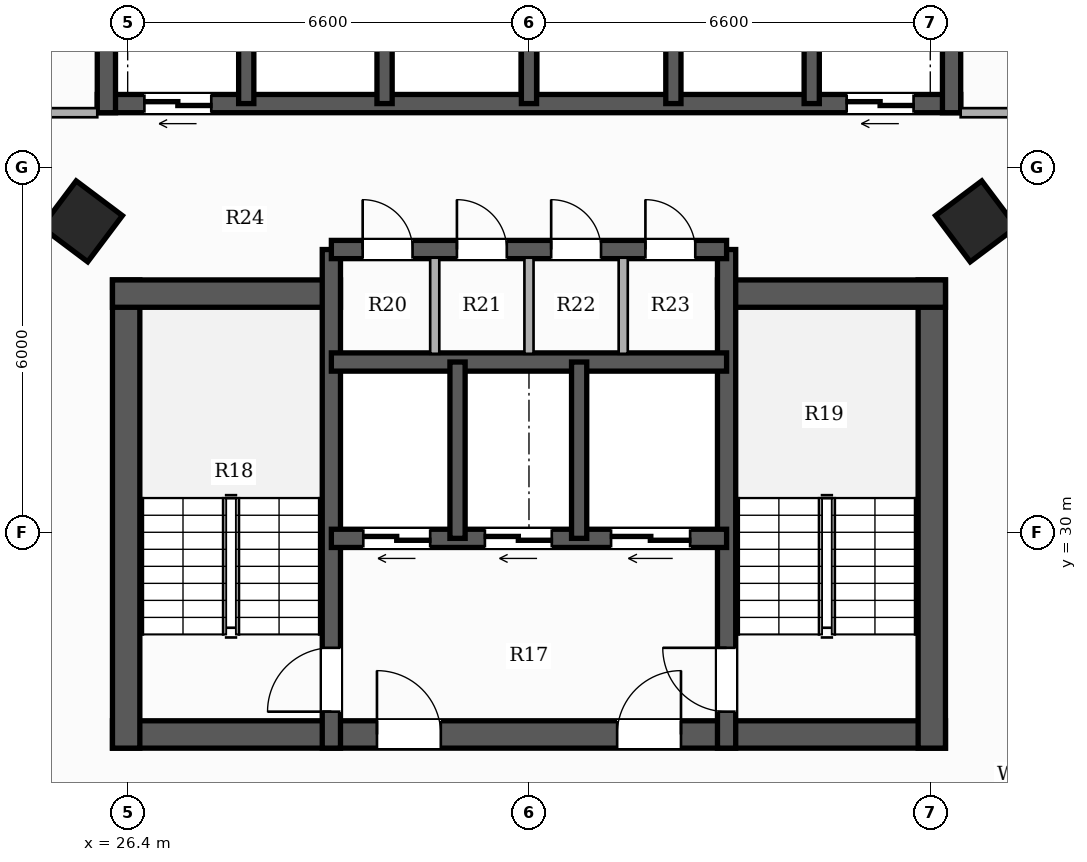
"""IFC4 building model, lengths in metres.
Left out: names, types, materials, properties, quantities, classifications, styles, units other than length and angle.
Written with IfcOpenShell. Run it as: python <this file> out.ifc"""

import sys

from ifc_helpers import new_model, si_unit, direction, frame, frame_2d, origin, origin_2d, place, context, subcontext, project, spatial, rectangle, hollow_rectangle, extrude, element, fill, save


model = new_model("IFC4")
c1 = context("Model", 3, precision=1e-05, world=origin(), true_north=direction((0.0, 1.0)))
c2 = subcontext(c1, "Body", "Model", "MODEL_VIEW")
j1 = project(units=[si_unit("LENGTHUNIT", "METRE"), si_unit("PLANEANGLEUNIT", "RADIAN")], contexts=[c1])
p1 = place(None, origin())
s1 = spatial("IfcSite", under=j1, at=p1, CompositionType="ELEMENT")
p2 = place(p1, origin())
s2 = spatial("IfcBuilding", under=s1, at=p2, CompositionType="ELEMENT")
p3 = place(p2, frame((0.0, 0.0, 70.85)))
s3 = spatial("IfcBuildingStorey", under=s2, at=p3, CompositionType="ELEMENT", Elevation=70.85)
p4 = place(p3, frame((26.15, 26.675, 0.0), z_axis=(0.0, 0.0, 1.0), x_axis=(1.0, 0.0, 0.0)))
e1 = element("IfcWall", 1, at=p4, inside=s3, PredefinedType="SHEAR", context=c2, shape_type="SweptSolid", body=[
    extrude(rectangle(XDim=13.7, YDim=0.45, at=frame_2d((6.85, 0.0))), origin(), (0.0, 0.0, 1.0), 3.3),
])
p5 = place(p4, frame((4.35, 0.0, 0.0)))
e2 = element("IfcOpeningElement", 2, at=p5, cuts=e1, PredefinedType="OPENING", context=c2, shape_type="SweptSolid", body=[
    extrude(rectangle(XDim=1.05, YDim=2.15, at=frame_2d((0.525, 1.075))), frame((0.0, 0.235, 0.0), z_axis=(0.0, -1.0, 0.0), x_axis=(1.0, 0.0, 0.0)), (0.0, 0.0, 1.0), 0.47),
])
p6 = place(p4, frame((8.3, 0.0, 0.0)))
e3 = element("IfcOpeningElement", 3, at=p6, cuts=e1, PredefinedType="OPENING", context=c2, shape_type="SweptSolid", body=[
    extrude(rectangle(XDim=1.05, YDim=2.15, at=frame_2d((0.525, 1.075))), frame((0.0, 0.235, 0.0), z_axis=(0.0, -1.0, 0.0), x_axis=(1.0, 0.0, 0.0)), (0.0, 0.0, 1.0), 0.47),
])
p7 = place(p3, frame((26.375, 26.45, 0.0), z_axis=(0.0, 0.0, 1.0), x_axis=(0.0, 1.0, 0.0)))
e4 = element("IfcWall", 4, at=p7, inside=s3, PredefinedType="SHEAR", context=c2, shape_type="SweptSolid", body=[
    extrude(rectangle(XDim=7.7, YDim=0.45, at=frame_2d((3.85, 0.0))), origin(), (0.0, 0.0, 1.0), 3.3),
])
p8 = place(p3, frame((26.15, 33.925, 0.0), z_axis=(0.0, 0.0, 1.0), x_axis=(1.0, 0.0, 0.0)))
e5 = element("IfcWall", 5, at=p8, inside=s3, PredefinedType="SHEAR", context=c2, shape_type="SweptSolid", body=[
    extrude(rectangle(XDim=3.75, YDim=0.45, at=frame_2d((1.875, 0.0))), origin(), (0.0, 0.0, 1.0), 3.3),
])
p9 = place(p3, frame((39.625, 26.45, 0.0), z_axis=(0.0, 0.0, 1.0), x_axis=(0.0, 1.0, 0.0)))
e6 = element("IfcWall", 6, at=p9, inside=s3, PredefinedType="SHEAR", context=c2, shape_type="SweptSolid", body=[
    extrude(rectangle(XDim=7.7, YDim=0.45, at=frame_2d((3.85, 0.0))), origin(), (0.0, 0.0, 1.0), 3.3),
])
p10 = place(p3, frame((36.1, 33.925, 0.0), z_axis=(0.0, 0.0, 1.0), x_axis=(1.0, 0.0, 0.0)))
e7 = element("IfcWall", 7, at=p10, inside=s3, PredefinedType="SHEAR", context=c2, shape_type="SweptSolid", body=[
    extrude(rectangle(XDim=3.75, YDim=0.45, at=frame_2d((1.875, 0.0))), origin(), (0.0, 0.0, 1.0), 3.3),
])
p11 = place(p3, frame((29.75, 26.45, 0.0), z_axis=(0.0, 0.0, 1.0), x_axis=(0.0, 1.0, 0.0)))
e8 = element("IfcWall", 8, at=p11, inside=s3, PredefinedType="SHEAR", context=c2, shape_type="SweptSolid", body=[
    extrude(rectangle(XDim=8.2, YDim=0.3, at=frame_2d((4.1, 0.0))), origin(), (0.0, 0.0, 1.0), 3.3),
])
p12 = place(p11, frame((0.6, 0.0, 0.0)))
e9 = element("IfcOpeningElement", 9, at=p12, cuts=e8, PredefinedType="OPENING", context=c2, shape_type="SweptSolid", body=[
    extrude(rectangle(XDim=1.05, YDim=2.15, at=frame_2d((0.525, 1.075))), frame((0.0, 0.16, 0.0), z_axis=(0.0, -1.0, 0.0), x_axis=(1.0, 0.0, 0.0)), (0.0, 0.0, 1.0), 0.32),
])
p13 = place(p3, frame((36.25, 26.45, 0.0), z_axis=(0.0, 0.0, 1.0), x_axis=(0.0, 1.0, 0.0)))
e10 = element("IfcWall", 10, at=p13, inside=s3, PredefinedType="SHEAR", context=c2, shape_type="SweptSolid", body=[
    extrude(rectangle(XDim=8.2, YDim=0.3, at=frame_2d((4.1, 0.0))), origin(), (0.0, 0.0, 1.0), 3.3),
])
p14 = place(p13, frame((0.6, 0.0, 0.0)))
e11 = element("IfcOpeningElement", 11, at=p14, cuts=e10, PredefinedType="OPENING", context=c2, shape_type="SweptSolid", body=[
    extrude(rectangle(XDim=1.05, YDim=2.15, at=frame_2d((0.525, 1.075))), frame((0.0, 0.16, 0.0), z_axis=(0.0, -1.0, 0.0), x_axis=(1.0, 0.0, 0.0)), (0.0, 0.0, 1.0), 0.32),
])
p15 = place(p3, frame((36.25, 29.9, 0.0), z_axis=(0.0, 0.0, 1.0), x_axis=(-1.0, 0.0, 0.0)))
e12 = element("IfcWall", 12, at=p15, inside=s3, PredefinedType="SHEAR", context=c2, shape_type="SweptSolid", body=[
    extrude(rectangle(XDim=6.5, YDim=0.3, at=frame_2d((3.25, 0.0))), origin(), (0.0, 0.0, 1.0), 3.3),
])
p16 = place(p15, frame((4.875, 0.0, 0.0)))
e13 = element("IfcOpeningElement", 13, at=p16, cuts=e12, PredefinedType="OPENING", context=c2, shape_type="SweptSolid", body=[
    extrude(rectangle(XDim=1.1, YDim=2.2, at=frame_2d((0.55, 1.1))), frame((0.0, 0.16, 0.0), z_axis=(0.0, -1.0, 0.0), x_axis=(1.0, 0.0, 0.0)), (0.0, 0.0, 1.0), 0.32),
])
p17 = place(p15, frame((2.875, 0.0, 0.0)))
e14 = element("IfcOpeningElement", 14, at=p17, cuts=e12, PredefinedType="OPENING", context=c2, shape_type="SweptSolid", body=[
    extrude(rectangle(XDim=1.1, YDim=2.2, at=frame_2d((0.55, 1.1))), frame((0.0, 0.16, 0.0), z_axis=(0.0, -1.0, 0.0), x_axis=(1.0, 0.0, 0.0)), (0.0, 0.0, 1.0), 0.32),
])
p18 = place(p15, frame((0.6, 0.0, 0.0)))
e15 = element("IfcOpeningElement", 15, at=p18, cuts=e12, PredefinedType="OPENING", context=c2, shape_type="SweptSolid", body=[
    extrude(rectangle(XDim=1.3, YDim=2.2, at=frame_2d((0.65, 1.1))), frame((0.0, 0.16, 0.0), z_axis=(0.0, -1.0, 0.0), x_axis=(1.0, 0.0, 0.0)), (0.0, 0.0, 1.0), 0.32),
])
p19 = place(p3, frame((29.75, 32.8, 0.0), z_axis=(0.0, 0.0, 1.0), x_axis=(1.0, 0.0, 0.0)))
e16 = element("IfcWall", 16, at=p19, inside=s3, PredefinedType="SHEAR", context=c2, shape_type="SweptSolid", body=[
    extrude(rectangle(XDim=6.5, YDim=0.3, at=frame_2d((3.25, 0.0))), origin(), (0.0, 0.0, 1.0), 3.3),
])
for number, where, z_axis, x_axis in (
    (17, (31.825, 29.9, 0.0), (0.0, 0.0, 1.0), (0.0, 1.0, 0.0)),
    (18, (33.825, 29.9, 0.0), (0.0, 0.0, 1.0), (0.0, 1.0, 0.0)),
):
    element("IfcWall", number, at=place(p3, frame(where, z_axis=z_axis, x_axis=x_axis)), inside=s3, PredefinedType="SHEAR", context=c2, shape_type="SweptSolid", body=[
        extrude(rectangle(XDim=2.9, YDim=0.25, at=frame_2d((1.45, 0.0))), origin(), (0.0, 0.0, 1.0), 3.3),
    ])
p20 = place(p3, frame((29.75, 34.65, 0.0), z_axis=(0.0, 0.0, 1.0), x_axis=(1.0, 0.0, 0.0)))
e19 = element("IfcWall", 19, at=p20, inside=s3, PredefinedType="SHEAR", context=c2, shape_type="SweptSolid", body=[
    extrude(rectangle(XDim=6.5, YDim=0.3, at=frame_2d((3.25, 0.0))), origin(), (0.0, 0.0, 1.0), 3.3),
])
p21 = place(p20, frame((0.515, 0.0, 0.0)))
e20 = element("IfcOpeningElement", 20, at=p21, cuts=e19, PredefinedType="OPENING", context=c2, shape_type="SweptSolid", body=[
    extrude(rectangle(XDim=0.82, YDim=2.1, at=frame_2d((0.41, 1.05))), frame((0.0, 0.16, 0.0), z_axis=(0.0, -1.0, 0.0), x_axis=(1.0, 0.0, 0.0)), (0.0, 0.0, 1.0), 0.32),
])
p22 = place(p20, frame((2.065, 0.0, 0.0)))
e21 = element("IfcOpeningElement", 21, at=p22, cuts=e19, PredefinedType="OPENING", context=c2, shape_type="SweptSolid", body=[
    extrude(rectangle(XDim=0.82, YDim=2.1, at=frame_2d((0.41, 1.05))), frame((0.0, 0.16, 0.0), z_axis=(0.0, -1.0, 0.0), x_axis=(1.0, 0.0, 0.0)), (0.0, 0.0, 1.0), 0.32),
])
p23 = place(p20, frame((3.615, 0.0, 0.0)))
e22 = element("IfcOpeningElement", 22, at=p23, cuts=e19, PredefinedType="OPENING", context=c2, shape_type="SweptSolid", body=[
    extrude(rectangle(XDim=0.82, YDim=2.1, at=frame_2d((0.41, 1.05))), frame((0.0, 0.16, 0.0), z_axis=(0.0, -1.0, 0.0), x_axis=(1.0, 0.0, 0.0)), (0.0, 0.0, 1.0), 0.32),
])
p24 = place(p20, frame((5.165, 0.0, 0.0)))
e23 = element("IfcOpeningElement", 23, at=p24, cuts=e19, PredefinedType="OPENING", context=c2, shape_type="SweptSolid", body=[
    extrude(rectangle(XDim=0.82, YDim=2.1, at=frame_2d((0.41, 1.05))), frame((0.0, 0.16, 0.0), z_axis=(0.0, -1.0, 0.0), x_axis=(1.0, 0.0, 0.0)), (0.0, 0.0, 1.0), 0.32),
])
p25 = place(p3, frame((40.1, 37.05, 0.0), z_axis=(0.0, 0.0, 1.0), x_axis=(-1.0, 0.0, 0.0)))
e24 = element("IfcWall", 24, at=p25, inside=s3, PredefinedType="SHEAR", context=c2, shape_type="SweptSolid", body=[
    extrude(rectangle(XDim=14.2, YDim=0.3, at=frame_2d((7.1, 0.0))), origin(), (0.0, 0.0, 1.0), 3.3),
])
p26 = place(p25, frame((12.325, 0.0, 0.0)))
e25 = element("IfcOpeningElement", 25, at=p26, cuts=e24, PredefinedType="OPENING", context=c2, shape_type="SweptSolid", body=[
    extrude(rectangle(XDim=1.1, YDim=2.2, at=frame_2d((0.55, 1.1))), frame((0.0, 0.16, 0.0), z_axis=(0.0, -1.0, 0.0), x_axis=(1.0, 0.0, 0.0)), (0.0, 0.0, 1.0), 0.32),
])
p27 = place(p25, frame((0.775, 0.0, 0.0)))
e26 = element("IfcOpeningElement", 26, at=p27, cuts=e24, PredefinedType="OPENING", context=c2, shape_type="SweptSolid", body=[
    extrude(rectangle(XDim=1.1, YDim=2.2, at=frame_2d((0.55, 1.1))), frame((0.0, 0.16, 0.0), z_axis=(0.0, -1.0, 0.0), x_axis=(1.0, 0.0, 0.0)), (0.0, 0.0, 1.0), 0.32),
])
for number, where, z_axis, x_axis in (
    (27, (26.05, 36.9, 0.0), (0.0, 0.0, 1.0), (0.0, 1.0, 0.0)),
    (28, (39.95, 36.9, 0.0), (0.0, 0.0, 1.0), (0.0, 1.0, 0.0)),
):
    element("IfcWall", number, at=place(p3, frame(where, z_axis=z_axis, x_axis=x_axis)), inside=s3, PredefinedType="SHEAR", context=c2, shape_type="SweptSolid", body=[
        extrude(rectangle(XDim=2.85, YDim=0.3, at=frame_2d((1.425, 0.0))), origin(), (0.0, 0.0, 1.0), 3.3),
    ])
for number, where, z_axis, x_axis in (
    (29, (28.35, 37.05, 0.0), (0.0, 0.0, 1.0), (0.0, 1.0, 0.0)),
    (30, (30.625, 37.05, 0.0), (0.0, 0.0, 1.0), (0.0, 1.0, 0.0)),
    (31, (33.0, 37.05, 0.0), (0.0, 0.0, 1.0), (0.0, 1.0, 0.0)),
    (32, (35.375, 37.05, 0.0), (0.0, 0.0, 1.0), (0.0, 1.0, 0.0)),
    (33, (37.65, 37.05, 0.0), (0.0, 0.0, 1.0), (0.0, 1.0, 0.0)),
):
    element("IfcWall", number, at=place(p3, frame(where, z_axis=z_axis, x_axis=x_axis)), inside=s3, PredefinedType="SHEAR", context=c2, shape_type="SweptSolid", body=[
        extrude(rectangle(XDim=2.55, YDim=0.25, at=frame_2d((1.275, 0.0))), origin(), (0.0, 0.0, 1.0), 3.3),
    ])
for number, where, z_axis, x_axis in (
    (34, (25.648, 35.113, 0.0), (0.0, 0.0, 1.0), (0.6, 0.8, 0.0)),
    (35, (40.352, 35.113, 0.0), (0.0, 0.0, 1.0), (-0.6, 0.8, 0.0)),
):
    element("IfcColumn", number, at=place(p3, frame(where, z_axis=z_axis, x_axis=x_axis)), inside=s3, PredefinedType="COLUMN", context=c2, shape_type="SweptSolid", body=[
        extrude(hollow_rectangle(XDim=0.95, YDim=0.95, WallThickness=0.032, at=origin_2d()), origin(), (0.0, 0.0, 1.0), 3.3),
    ])
for number, where, z_axis, x_axis in (
    (36, (31.45, 32.935, 0.0), (0.0, 0.0, 1.0), (0.0, 1.0, 0.0)),
    (37, (33.0, 32.935, 0.0), (0.0, 0.0, 1.0), (0.0, 1.0, 0.0)),
    (38, (34.55, 32.935, 0.0), (0.0, 0.0, 1.0), (0.0, 1.0, 0.0)),
):
    element("IfcWall", number, at=place(p3, frame(where, z_axis=z_axis, x_axis=x_axis)), inside=s3, PredefinedType="PARTITIONING", context=c2, shape_type="SweptSolid", body=[
        extrude(rectangle(XDim=1.58, YDim=0.15, at=frame_2d((0.79, 0.0))), origin(), (0.0, 0.0, 1.0), 3.06),
    ])
p28 = place(p3, frame((40.1, 36.9, 0.0), z_axis=(0.0, 0.0, 1.0), x_axis=(1.0, 0.0, 0.0)))
e39 = element("IfcWall", 39, at=p28, inside=s3, PredefinedType="PARTITIONING", context=c2, shape_type="SweptSolid", body=[
    extrude(rectangle(XDim=2.55, YDim=0.15, at=frame_2d((1.275, 0.0))), origin(), (0.0, 0.0, 1.0), 2.413),
])
p29 = place(p28, frame((1.069, 0.0, 0.0)))
e40 = element("IfcOpeningElement", 40, at=p29, cuts=e39, PredefinedType="OPENING", context=c2, shape_type="SweptSolid", body=[
    extrude(rectangle(XDim=0.88, YDim=2.1, at=frame_2d((0.44, 1.05))), frame((0.0, 0.085, 0.0), z_axis=(0.0, -1.0, 0.0), x_axis=(1.0, 0.0, 0.0)), (0.0, 0.0, 1.0), 0.17),
])
p30 = place(p3, frame((23.41, 36.9, 0.0), z_axis=(0.0, 0.0, 1.0), x_axis=(1.0, 0.0, 0.0)))
e41 = element("IfcWall", 41, at=p30, inside=s3, PredefinedType="PARTITIONING", context=c2, shape_type="SweptSolid", body=[
    extrude(rectangle(XDim=2.49, YDim=0.15, at=frame_2d((1.245, 0.0))), origin(), (0.0, 0.0, 1.0), 2.413),
])
p31 = place(p12, origin())
e42 = element("IfcDoor", 42, at=p31, inside=s3, OperationType="SINGLE_SWING_LEFT", PredefinedType="DOOR", context=c2, shape_type="SweptSolid", body=[
    extrude(rectangle(XDim=1.05, YDim=2.15, at=frame_2d((0.525, 1.075))), frame((0.0, 0.025, 0.0), z_axis=(0.0, -1.0, 0.0), x_axis=(1.0, 0.0, 0.0)), (0.0, 0.0, 1.0), 0.05),
])
fill(e9, e42)
p32 = place(p14, origin())
e43 = element("IfcDoor", 43, at=p32, inside=s3, OperationType="SINGLE_SWING_RIGHT", PredefinedType="DOOR", context=c2, shape_type="SweptSolid", body=[
    extrude(rectangle(XDim=1.05, YDim=2.15, at=frame_2d((0.525, 1.075))), frame((0.0, 0.025, 0.0), z_axis=(0.0, -1.0, 0.0), x_axis=(1.0, 0.0, 0.0)), (0.0, 0.0, 1.0), 0.05),
])
fill(e11, e43)
p33 = place(p5, origin())
e44 = element("IfcDoor", 44, at=p33, inside=s3, OperationType="SINGLE_SWING_LEFT", PredefinedType="DOOR", context=c2, shape_type="SweptSolid", body=[
    extrude(rectangle(XDim=1.05, YDim=2.15, at=frame_2d((0.525, 1.075))), frame((0.0, 0.025, 0.0), z_axis=(0.0, -1.0, 0.0), x_axis=(1.0, 0.0, 0.0)), (0.0, 0.0, 1.0), 0.05),
])
fill(e2, e44)
p34 = place(p6, origin())
e45 = element("IfcDoor", 45, at=p34, inside=s3, OperationType="SINGLE_SWING_RIGHT", PredefinedType="DOOR", context=c2, shape_type="SweptSolid", body=[
    extrude(rectangle(XDim=1.05, YDim=2.15, at=frame_2d((0.525, 1.075))), frame((0.0, 0.025, 0.0), z_axis=(0.0, -1.0, 0.0), x_axis=(1.0, 0.0, 0.0)), (0.0, 0.0, 1.0), 0.05),
])
fill(e3, e45)
p35 = place(p16, origin())
e46 = element("IfcDoor", 46, at=p35, inside=s3, OperationType="DOUBLE_DOOR_SLIDING", PredefinedType="DOOR", context=c2, shape_type="SweptSolid", body=[
    extrude(rectangle(XDim=1.1, YDim=2.2, at=frame_2d((0.55, 1.1))), frame((0.0, 0.025, 0.0), z_axis=(0.0, -1.0, 0.0), x_axis=(1.0, 0.0, 0.0)), (0.0, 0.0, 1.0), 0.05),
])
fill(e13, e46)
p36 = place(p17, origin())
e47 = element("IfcDoor", 47, at=p36, inside=s3, OperationType="DOUBLE_DOOR_SLIDING", PredefinedType="DOOR", context=c2, shape_type="SweptSolid", body=[
    extrude(rectangle(XDim=1.1, YDim=2.2, at=frame_2d((0.55, 1.1))), frame((0.0, 0.025, 0.0), z_axis=(0.0, -1.0, 0.0), x_axis=(1.0, 0.0, 0.0)), (0.0, 0.0, 1.0), 0.05),
])
fill(e14, e47)
p37 = place(p18, origin())
e48 = element("IfcDoor", 48, at=p37, inside=s3, OperationType="DOUBLE_DOOR_SLIDING", PredefinedType="DOOR", context=c2, shape_type="SweptSolid", body=[
    extrude(rectangle(XDim=1.3, YDim=2.2, at=frame_2d((0.65, 1.1))), frame((0.0, 0.025, 0.0), z_axis=(0.0, -1.0, 0.0), x_axis=(1.0, 0.0, 0.0)), (0.0, 0.0, 1.0), 0.05),
])
fill(e15, e48)
p38 = place(p26, origin())
e49 = element("IfcDoor", 49, at=p38, inside=s3, OperationType="DOUBLE_DOOR_SLIDING", PredefinedType="DOOR", context=c2, shape_type="SweptSolid", body=[
    extrude(rectangle(XDim=1.1, YDim=2.2, at=frame_2d((0.55, 1.1))), frame((0.0, 0.025, 0.0), z_axis=(0.0, -1.0, 0.0), x_axis=(1.0, 0.0, 0.0)), (0.0, 0.0, 1.0), 0.05),
])
fill(e25, e49)
p39 = place(p27, origin())
e50 = element("IfcDoor", 50, at=p39, inside=s3, OperationType="DOUBLE_DOOR_SLIDING", PredefinedType="DOOR", context=c2, shape_type="SweptSolid", body=[
    extrude(rectangle(XDim=1.1, YDim=2.2, at=frame_2d((0.55, 1.1))), frame((0.0, 0.025, 0.0), z_axis=(0.0, -1.0, 0.0), x_axis=(1.0, 0.0, 0.0)), (0.0, 0.0, 1.0), 0.05),
])
fill(e26, e50)
p40 = place(p21, origin())
e51 = element("IfcDoor", 51, at=p40, inside=s3, OperationType="SINGLE_SWING_LEFT", PredefinedType="DOOR", context=c2, shape_type="SweptSolid", body=[
    extrude(rectangle(XDim=0.82, YDim=2.1, at=frame_2d((0.41, 1.05))), frame((0.0, 0.025, 0.0), z_axis=(0.0, -1.0, 0.0), x_axis=(1.0, 0.0, 0.0)), (0.0, 0.0, 1.0), 0.05),
])
fill(e20, e51)
p41 = place(p22, origin())
e52 = element("IfcDoor", 52, at=p41, inside=s3, OperationType="SINGLE_SWING_LEFT", PredefinedType="DOOR", context=c2, shape_type="SweptSolid", body=[
    extrude(rectangle(XDim=0.82, YDim=2.1, at=frame_2d((0.41, 1.05))), frame((0.0, 0.025, 0.0), z_axis=(0.0, -1.0, 0.0), x_axis=(1.0, 0.0, 0.0)), (0.0, 0.0, 1.0), 0.05),
])
fill(e21, e52)
p42 = place(p23, origin())
e53 = element("IfcDoor", 53, at=p42, inside=s3, OperationType="SINGLE_SWING_LEFT", PredefinedType="DOOR", context=c2, shape_type="SweptSolid", body=[
    extrude(rectangle(XDim=0.82, YDim=2.1, at=frame_2d((0.41, 1.05))), frame((0.0, 0.025, 0.0), z_axis=(0.0, -1.0, 0.0), x_axis=(1.0, 0.0, 0.0)), (0.0, 0.0, 1.0), 0.05),
])
fill(e22, e53)
p43 = place(p24, origin())
e54 = element("IfcDoor", 54, at=p43, inside=s3, OperationType="SINGLE_SWING_LEFT", PredefinedType="DOOR", context=c2, shape_type="SweptSolid", body=[
    extrude(rectangle(XDim=0.82, YDim=2.1, at=frame_2d((0.41, 1.05))), frame((0.0, 0.025, 0.0), z_axis=(0.0, -1.0, 0.0), x_axis=(1.0, 0.0, 0.0)), (0.0, 0.0, 1.0), 0.05),
])
fill(e23, e54)
save(model, sys.argv[1])
